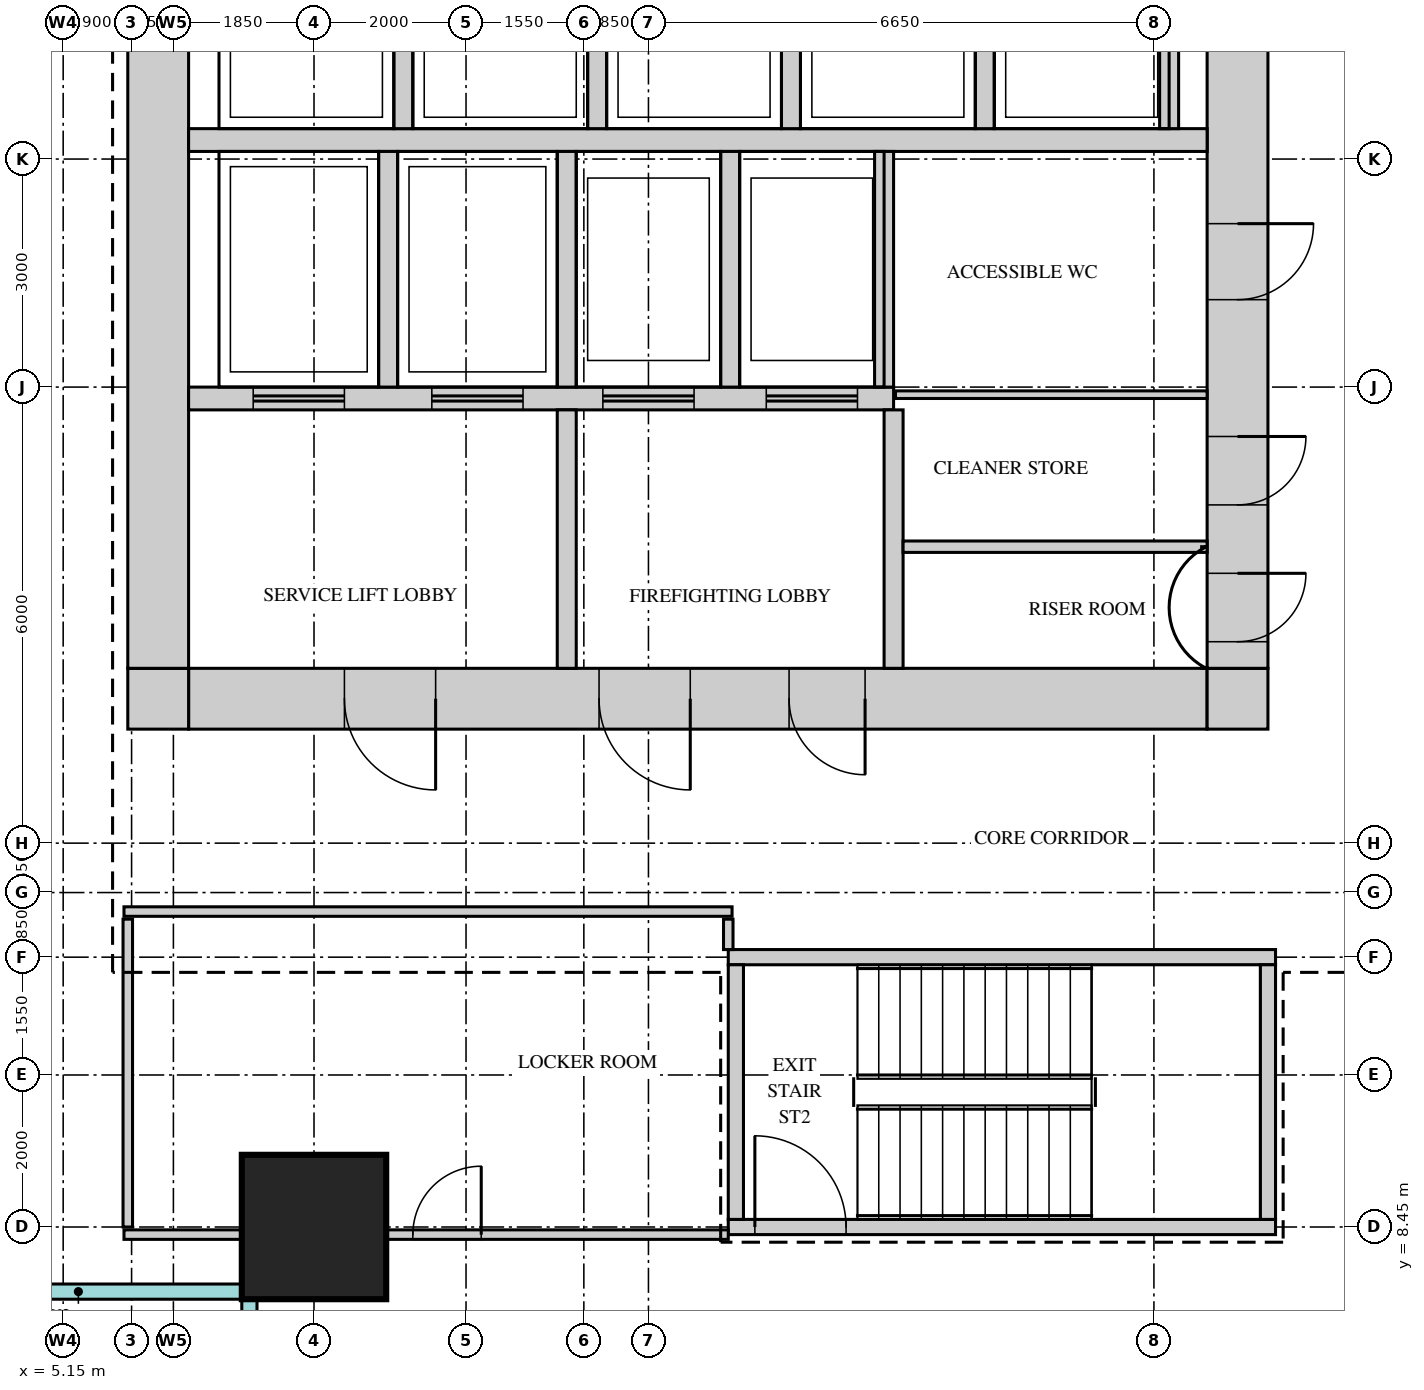
"""IFC4 building model, lengths in metres.
Left out: names, types, materials, properties, quantities, classifications, styles, units other than length and angle.
Written with IfcOpenShell. Run it as: python <this file> out.ifc"""

import sys

from ifc_helpers import new_model, si_unit, direction, frame, frame_2d, origin, origin_2d, place, context, subcontext, project, spatial, rectangle, extrude, source, transform, mapped, element, fill, save


model = new_model("IFC4")
c1 = context("Model", 3, precision=1e-05, world=origin(), true_north=direction((0.0, 1.0)))
c2 = subcontext(c1, "Body", "Model", "MODEL_VIEW")
j1 = project(units=[si_unit("LENGTHUNIT", "METRE"), si_unit("PLANEANGLEUNIT", "RADIAN")], contexts=[c1])
p1 = place(None, origin())
s1 = spatial("IfcSite", under=j1, at=p1, CompositionType="ELEMENT")
p2 = place(p1, origin())
s2 = spatial("IfcBuilding", under=s1, at=p2, CompositionType="ELEMENT")
p3 = place(p2, frame((0.0, 0.0, 192.7)))
s3 = spatial("IfcBuildingStorey", under=s2, at=p3, CompositionType="ELEMENT", Elevation=192.7)
m1 = source(origin(), c2, "Body", "SweptSolid", [
    extrude(rectangle(XDim=13.4, YDim=0.8, at=frame_2d((6.7, 0.0))), origin(), (0.0, 0.0, 1.0), 3.75),
])
p4 = place(p3, frame((6.8, 15.4, 0.0), z_axis=(0.0, 0.0, 1.0), x_axis=(1.0, 0.0, 0.0)))
e1 = element("IfcWall", 1, at=p4, inside=s3, PredefinedType="SHEAR", context=c2, shape_type="MappedRepresentation", body=[
    mapped(m1, transform((0.0, 0.0, 0.0))),
])
m2 = source(origin(), c2, "Body", "SweptSolid", [
    extrude(rectangle(XDim=1.2, YDim=2.1, at=frame_2d((0.6, 1.05))), frame((0.0, 0.41, 0.0), z_axis=(0.0, -1.0, 0.0), x_axis=(1.0, 0.0, 0.0)), (0.0, 0.0, 1.0), 0.82),
])
p5 = place(p4, frame((5.4, 0.0, 0.0)))
e2 = element("IfcOpeningElement", 2, at=p5, cuts=e1, PredefinedType="OPENING", context=c2, shape_type="MappedRepresentation", body=[
    mapped(m2, transform((0.0, 0.0, 0.0))),
])
p6 = place(p4, frame((2.05, 0.0, 0.0)))
e3 = element("IfcOpeningElement", 3, at=p6, cuts=e1, PredefinedType="OPENING", context=c2, shape_type="MappedRepresentation", body=[
    mapped(m2, transform((0.0, 0.0, 0.0))),
])
m3 = source(origin(), c2, "Body", "SweptSolid", [
    extrude(rectangle(XDim=1.0, YDim=2.1, at=frame_2d((0.5, 1.05))), frame((0.0, 0.41, 0.0), z_axis=(0.0, -1.0, 0.0), x_axis=(1.0, 0.0, 0.0)), (0.0, 0.0, 1.0), 0.82),
])
p7 = place(p4, frame((7.9, 0.0, 0.0)))
e4 = element("IfcOpeningElement", 4, at=p7, cuts=e1, PredefinedType="OPENING", context=c2, shape_type="MappedRepresentation", body=[
    mapped(m3, transform((0.0, 0.0, 0.0))),
])
m4 = source(origin(), c2, "Body", "SweptSolid", [
    extrude(rectangle(XDim=0.8, YDim=0.8, at=frame_2d((0.4, 0.0))), origin(), (0.0, 0.0, 1.0), 3.75),
])
for number, where, z_axis, x_axis in (
    (5, (20.2, 15.4, 0.0), (0.0, 0.0, 1.0), (1.0, 0.0, 0.0)),
    (6, (6.0, 15.4, 0.0), (0.0, 0.0, 1.0), (1.0, 0.0, 0.0)),
):
    element("IfcWall", number, at=place(p3, frame(where, z_axis=z_axis, x_axis=x_axis)), inside=s3, PredefinedType="SHEAR", context=c2, shape_type="MappedRepresentation", body=[
        mapped(m4, transform((0.0, 0.0, 0.0))),
    ])
m5 = source(origin(), c2, "Body", "SweptSolid", [
    extrude(rectangle(XDim=22.4, YDim=0.8, at=frame_2d((11.2, 0.0))), origin(), (0.0, 0.0, 1.0), 3.75),
])
p8 = place(p3, frame((20.6, 15.8, 0.0), z_axis=(0.0, 0.0, 1.0), x_axis=(0.0, 1.0, 0.0)))
e7 = element("IfcWall", 7, at=p8, inside=s3, PredefinedType="SHEAR", context=c2, shape_type="MappedRepresentation", body=[
    mapped(m5, transform((0.0, 0.0, 0.0))),
])
m6 = source(origin(), c2, "Body", "SweptSolid", [
    extrude(rectangle(XDim=1.8, YDim=2.1, at=frame_2d((0.9, 1.05))), frame((0.0, 0.41, 0.0), z_axis=(0.0, -1.0, 0.0), x_axis=(1.0, 0.0, 0.0)), (0.0, 0.0, 1.0), 0.82),
])
p9 = place(p8, frame((10.7, 0.0, 0.0)))
e8 = element("IfcOpeningElement", 8, at=p9, cuts=e7, PredefinedType="OPENING", context=c2, shape_type="MappedRepresentation", body=[
    mapped(m6, transform((0.0, 0.0, 0.0))),
])
m7 = source(origin(), c2, "Body", "SweptSolid", [
    extrude(rectangle(XDim=0.9, YDim=2.1, at=frame_2d((0.45, 1.05))), frame((0.0, 0.41, 0.0), z_axis=(0.0, -1.0, 0.0), x_axis=(1.0, 0.0, 0.0)), (0.0, 0.0, 1.0), 0.82),
])
p10 = place(p8, frame((0.35, 0.0, 0.0)))
e9 = element("IfcOpeningElement", 9, at=p10, cuts=e7, PredefinedType="OPENING", context=c2, shape_type="MappedRepresentation", body=[
    mapped(m7, transform((0.0, 0.0, 0.0))),
])
p11 = place(p8, frame((2.15, 0.0, 0.0)))
e10 = element("IfcOpeningElement", 10, at=p11, cuts=e7, PredefinedType="OPENING", context=c2, shape_type="MappedRepresentation", body=[
    mapped(m7, transform((0.0, 0.0, 0.0))),
])
p12 = place(p8, frame((4.85, 0.0, 0.0)))
e11 = element("IfcOpeningElement", 11, at=p12, cuts=e7, PredefinedType="OPENING", context=c2, shape_type="MappedRepresentation", body=[
    mapped(m3, transform((0.0, 0.0, 0.0))),
])
p13 = place(p3, frame((6.4, 15.8, 0.0), z_axis=(0.0, 0.0, 1.0), x_axis=(0.0, 1.0, 0.0)))
e12 = element("IfcWall", 12, at=p13, inside=s3, PredefinedType="SHEAR", context=c2, shape_type="MappedRepresentation", body=[
    mapped(m5, transform((0.0, 0.0, 0.0))),
])
m8 = source(origin(), c2, "Body", "SweptSolid", [
    extrude(rectangle(XDim=7.2, YDim=0.2, at=frame_2d((3.6, 0.0))), origin(), (0.0, 0.0, 1.0), 3.75),
])
p14 = place(p3, frame((13.9, 12.0, 0.0), z_axis=(0.0, 0.0, 1.0), x_axis=(1.0, 0.0, 0.0)))
e13 = element("IfcWall", 13, at=p14, inside=s3, PredefinedType="SHEAR", context=c2, shape_type="MappedRepresentation", body=[
    mapped(m8, transform((0.0, 0.0, 0.0))),
])
p15 = place(p3, frame((13.9, 8.45, 0.0), z_axis=(0.0, 0.0, 1.0), x_axis=(1.0, 0.0, 0.0)))
e14 = element("IfcWall", 14, at=p15, inside=s3, PredefinedType="SHEAR", context=c2, shape_type="MappedRepresentation", body=[
    mapped(m8, transform((0.0, 0.0, 0.0))),
])
m9 = source(origin(), c2, "Body", "SweptSolid", [
    extrude(rectangle(XDim=1.2, YDim=2.1, at=frame_2d((0.6, 1.05))), frame((0.0, 0.11, 0.0), z_axis=(0.0, -1.0, 0.0), x_axis=(1.0, 0.0, 0.0)), (0.0, 0.0, 1.0), 0.22),
])
p16 = place(p15, frame((0.35, 0.0, 0.0)))
e15 = element("IfcOpeningElement", 15, at=p16, cuts=e14, PredefinedType="OPENING", context=c2, shape_type="MappedRepresentation", body=[
    mapped(m9, transform((0.0, 0.0, 0.0))),
])
m10 = source(origin(), c2, "Body", "SweptSolid", [
    extrude(rectangle(XDim=3.35, YDim=0.2, at=frame_2d((1.675, 0.0))), origin(), (0.0, 0.0, 1.0), 3.75),
])
for number, where, z_axis, x_axis in (
    (16, (21.0, 8.55, 0.0), (0.0, 0.0, 1.0), (0.0, 1.0, 0.0)),
    (17, (14.0, 8.55, 0.0), (0.0, 0.0, 1.0), (0.0, 1.0, 0.0)),
):
    element("IfcWall", number, at=place(p3, frame(where, z_axis=z_axis, x_axis=x_axis)), inside=s3, PredefinedType="SHEAR", context=c2, shape_type="MappedRepresentation", body=[
        mapped(m10, transform((0.0, 0.0, 0.0))),
    ])
m11 = source(origin(), c2, "Body", "SweptSolid", [
    extrude(rectangle(XDim=13.4, YDim=0.3, at=frame_2d((6.7, 0.0))), origin(), (0.0, 0.0, 1.0), 3.75),
])
p17 = place(p3, frame((6.8, 22.75, 0.0), z_axis=(0.0, 0.0, 1.0), x_axis=(1.0, 0.0, 0.0)))
e18 = element("IfcWall", 18, at=p17, inside=s3, PredefinedType="STANDARD", context=c2, shape_type="MappedRepresentation", body=[
    mapped(m11, transform((0.0, 0.0, 0.0))),
])
m12 = source(origin(), c2, "Body", "SweptSolid", [
    extrude(rectangle(XDim=9.275, YDim=0.3, at=frame_2d((4.637, 0.0))), origin(), (0.0, 0.0, 1.0), 3.75),
])
p18 = place(p3, frame((6.8, 19.35, 0.0), z_axis=(0.0, 0.0, 1.0), x_axis=(1.0, 0.0, 0.0)))
e19 = element("IfcWall", 19, at=p18, inside=s3, PredefinedType="STANDARD", context=c2, shape_type="MappedRepresentation", body=[
    mapped(m12, transform((0.0, 0.0, 0.0))),
])
m13 = source(origin(), c2, "Body", "SweptSolid", [
    extrude(rectangle(XDim=1.2, YDim=2.1, at=frame_2d((0.6, 1.05))), frame((0.0, 0.16, 0.0), z_axis=(0.0, -1.0, 0.0), x_axis=(1.0, 0.0, 0.0)), (0.0, 0.0, 1.0), 0.32),
])
p19 = place(p18, frame((0.85, 0.0, 0.0)))
e20 = element("IfcOpeningElement", 20, at=p19, cuts=e19, PredefinedType="OPENING", context=c2, shape_type="MappedRepresentation", body=[
    mapped(m13, transform((0.0, 0.0, 0.0))),
])
p20 = place(p18, frame((3.2, 0.0, 0.0)))
e21 = element("IfcOpeningElement", 21, at=p20, cuts=e19, PredefinedType="OPENING", context=c2, shape_type="MappedRepresentation", body=[
    mapped(m13, transform((0.0, 0.0, 0.0))),
])
p21 = place(p18, frame((5.45, 0.0, 0.0)))
e22 = element("IfcOpeningElement", 22, at=p21, cuts=e19, PredefinedType="OPENING", context=c2, shape_type="MappedRepresentation", body=[
    mapped(m13, transform((0.0, 0.0, 0.0))),
])
p22 = place(p18, frame((7.6, 0.0, 0.0)))
e23 = element("IfcOpeningElement", 23, at=p22, cuts=e19, PredefinedType="OPENING", context=c2, shape_type="MappedRepresentation", body=[
    mapped(m13, transform((0.0, 0.0, 0.0))),
])
m14 = source(origin(), c2, "Body", "SweptSolid", [
    extrude(rectangle(XDim=3.1, YDim=0.25, at=frame_2d((1.55, 0.0))), origin(), (0.0, 0.0, 1.0), 3.75),
])
for number, where, z_axis, x_axis in (
    (24, (9.425, 19.5, 0.0), (0.0, 0.0, 1.0), (0.0, 1.0, 0.0)),
    (25, (11.775, 19.5, 0.0), (0.0, 0.0, 1.0), (0.0, 1.0, 0.0)),
    (26, (13.925, 19.5, 0.0), (0.0, 0.0, 1.0), (0.0, 1.0, 0.0)),
    (27, (15.95, 19.5, 0.0), (0.0, 0.0, 1.0), (0.0, 1.0, 0.0)),
):
    element("IfcWall", number, at=place(p3, frame(where, z_axis=z_axis, x_axis=x_axis)), inside=s3, PredefinedType="STANDARD", context=c2, shape_type="MappedRepresentation", body=[
        mapped(m14, transform((0.0, 0.0, 0.0))),
    ])
m15 = source(origin(), c2, "Body", "SweptSolid", [
    extrude(rectangle(XDim=2.4, YDim=0.25, at=frame_2d((1.2, 0.0))), origin(), (0.0, 0.0, 1.0), 3.75),
])
for number, where, z_axis, x_axis in (
    (28, (17.275, 22.9, 0.0), (0.0, 0.0, 1.0), (0.0, 1.0, 0.0)),
    (29, (19.7, 22.9, 0.0), (0.0, 0.0, 1.0), (0.0, 1.0, 0.0)),
    (30, (9.625, 22.9, 0.0), (0.0, 0.0, 1.0), (0.0, 1.0, 0.0)),
    (31, (12.175, 22.9, 0.0), (0.0, 0.0, 1.0), (0.0, 1.0, 0.0)),
    (32, (14.725, 22.9, 0.0), (0.0, 0.0, 1.0), (0.0, 1.0, 0.0)),
):
    element("IfcWall", number, at=place(p3, frame(where, z_axis=z_axis, x_axis=x_axis)), inside=s3, PredefinedType="STANDARD", context=c2, shape_type="MappedRepresentation", body=[
        mapped(m15, transform((0.0, 0.0, 0.0))),
    ])
m16 = source(origin(), c2, "Body", "SweptSolid", [
    extrude(rectangle(XDim=3.4, YDim=0.25, at=frame_2d((1.7, 0.0))), origin(), (0.0, 0.0, 1.0), 3.75),
])
for number, where, z_axis, x_axis in (
    (33, (16.075, 15.8, 0.0), (0.0, 0.0, 1.0), (0.0, 1.0, 0.0)),
    (34, (11.775, 15.8, 0.0), (0.0, 0.0, 1.0), (0.0, 1.0, 0.0)),
):
    element("IfcWall", number, at=place(p3, frame(where, z_axis=z_axis, x_axis=x_axis)), inside=s3, PredefinedType="STANDARD", context=c2, shape_type="MappedRepresentation", body=[
        mapped(m16, transform((0.0, 0.0, 0.0))),
    ])
m17 = source(origin(), c2, "Body", "SweptSolid", [
    extrude(rectangle(XDim=1.9, YDim=1.9, at=origin_2d()), origin(), (0.0, 0.0, 1.0), 4.0),
])
p23 = place(p3, frame((8.45, 8.45, 0.0), z_axis=(0.0, 0.0, 1.0), x_axis=(1.0, 0.0, 0.0)))
e35 = element("IfcColumn", 35, at=p23, inside=s3, PredefinedType="COLUMN", context=c2, shape_type="MappedRepresentation", body=[
    mapped(m17, transform((0.0, 0.0, 0.0))),
])
m18 = source(origin(), c2, "Body", "SweptSolid", [
    extrude(rectangle(XDim=7.95, YDim=0.125, at=frame_2d((3.975, 0.0))), origin(), (0.0, 0.0, 1.0), 3.25),
])
p24 = place(p3, frame((5.95, 8.35, 0.0), z_axis=(0.0, 0.0, 1.0), x_axis=(1.0, 0.0, 0.0)))
e36 = element("IfcWall", 36, at=p24, inside=s3, PredefinedType="PARTITIONING", context=c2, shape_type="MappedRepresentation", body=[
    mapped(m18, transform((0.0, 0.0, 0.0))),
])
m19 = source(origin(), c2, "Body", "SweptSolid", [
    extrude(rectangle(XDim=0.9, YDim=2.1, at=frame_2d((0.45, 1.05))), frame((0.0, 0.073, 0.0), z_axis=(0.0, -1.0, 0.0), x_axis=(1.0, 0.0, 0.0)), (0.0, 0.0, 1.0), 0.145),
])
p25 = place(p24, frame((3.8, 0.0, 0.0)))
e37 = element("IfcOpeningElement", 37, at=p25, cuts=e36, PredefinedType="OPENING", context=c2, shape_type="MappedRepresentation", body=[
    mapped(m19, transform((0.0, 0.0, 0.0))),
])
m20 = source(origin(), c2, "Body", "SweptSolid", [
    extrude(rectangle(XDim=4.05, YDim=0.125, at=frame_2d((2.025, 0.0))), origin(), (0.0, 0.0, 1.0), 3.8),
])
p26 = place(p3, frame((6.0, 8.45, 0.0), z_axis=(0.0, 0.0, 1.0), x_axis=(0.0, 1.0, 0.0)))
e38 = element("IfcWall", 38, at=p26, inside=s3, PredefinedType="PARTITIONING", context=c2, shape_type="MappedRepresentation", body=[
    mapped(m20, transform((0.0, 0.0, 0.0))),
])
m21 = source(origin(), c2, "Body", "SweptSolid", [
    extrude(rectangle(XDim=0.4, YDim=0.125, at=frame_2d((0.2, 0.0))), origin(), (0.0, 0.0, 1.0), 3.8),
])
p27 = place(p3, frame((13.9, 12.1, 0.0), z_axis=(0.0, 0.0, 1.0), x_axis=(0.0, 1.0, 0.0)))
e39 = element("IfcWall", 39, at=p27, inside=s3, PredefinedType="PARTITIONING", context=c2, shape_type="MappedRepresentation", body=[
    mapped(m21, transform((0.0, 0.0, 0.0))),
])
m22 = source(origin(), c2, "Body", "SweptSolid", [
    extrude(rectangle(XDim=8.0, YDim=0.125, at=frame_2d((4.0, 0.0))), origin(), (0.0, 0.0, 1.0), 3.8),
])
p28 = place(p3, frame((5.95, 12.6, 0.0), z_axis=(0.0, 0.0, 1.0), x_axis=(1.0, 0.0, 0.0)))
e40 = element("IfcWall", 40, at=p28, inside=s3, PredefinedType="PARTITIONING", context=c2, shape_type="MappedRepresentation", body=[
    mapped(m22, transform((0.0, 0.0, 0.0))),
])
m23 = source(origin(), c2, "Body", "SweptSolid", [
    extrude(rectangle(XDim=4.0, YDim=0.15, at=frame_2d((2.0, 0.0))), origin(), (0.0, 0.0, 1.0), 3.8),
])
p29 = place(p3, frame((16.2, 17.4, 0.0), z_axis=(0.0, 0.0, 1.0), x_axis=(1.0, 0.0, 0.0)))
e41 = element("IfcWall", 41, at=p29, inside=s3, PredefinedType="PARTITIONING", context=c2, shape_type="MappedRepresentation", body=[
    mapped(m23, transform((0.0, 0.0, 0.0))),
])
m24 = source(origin(), c2, "Body", "SweptSolid", [
    extrude(rectangle(XDim=4.1, YDim=0.1, at=frame_2d((2.05, 0.0))), origin(), (0.0, 0.0, 1.0), 3.8),
])
p30 = place(p3, frame((16.1, 19.4, 0.0), z_axis=(0.0, 0.0, 1.0), x_axis=(1.0, 0.0, 0.0)))
e42 = element("IfcWall", 42, at=p30, inside=s3, PredefinedType="PARTITIONING", context=c2, shape_type="MappedRepresentation", body=[
    mapped(m24, transform((0.0, 0.0, 0.0))),
])
m25 = source(origin(), c2, "Body", "SweptSolid", [
    extrude(rectangle(XDim=0.9, YDim=2.1, at=frame_2d((0.45, 1.05))), frame((0.0, 0.35, 0.0), z_axis=(0.0, -1.0, 0.0), x_axis=(1.0, 0.0, 0.0)), (0.0, 0.0, 1.0), 0.7),
])
p31 = place(p10, origin())
e43 = element("IfcDoor", 43, at=p31, inside=s3, OperationType="SINGLE_SWING_RIGHT", PredefinedType="DOOR", context=c2, shape_type="MappedRepresentation", body=[
    mapped(m25, transform((0.0, 0.0, 0.0))),
])
fill(e9, e43)
p32 = place(p11, origin())
e44 = element("IfcDoor", 44, at=p32, inside=s3, OperationType="SINGLE_SWING_RIGHT", PredefinedType="DOOR", context=c2, shape_type="MappedRepresentation", body=[
    mapped(m25, transform((0.0, 0.0, 0.0))),
])
fill(e10, e44)
m26 = source(origin(), c2, "Body", "SweptSolid", [
    extrude(rectangle(XDim=1.0, YDim=2.1, at=frame_2d((0.5, 1.05))), frame((0.0, 0.35, 0.0), z_axis=(0.0, -1.0, 0.0), x_axis=(1.0, 0.0, 0.0)), (0.0, 0.0, 1.0), 0.7),
])
p33 = place(p12, origin())
e45 = element("IfcDoor", 45, at=p33, inside=s3, OperationType="SINGLE_SWING_RIGHT", PredefinedType="DOOR", context=c2, shape_type="MappedRepresentation", body=[
    mapped(m26, transform((0.0, 0.0, 0.0))),
])
fill(e11, e45)
m27 = source(origin(), c2, "Body", "SweptSolid", [
    extrude(rectangle(XDim=1.2, YDim=2.1, at=frame_2d((0.6, 1.05))), frame((0.0, 0.35, 0.0), z_axis=(0.0, -1.0, 0.0), x_axis=(1.0, 0.0, 0.0)), (0.0, 0.0, 1.0), 0.7),
])
p34 = place(p5, origin())
e46 = element("IfcDoor", 46, at=p34, inside=s3, OperationType="SINGLE_SWING_RIGHT", PredefinedType="DOOR", context=c2, shape_type="MappedRepresentation", body=[
    mapped(m27, transform((0.0, 0.0, 0.0))),
])
fill(e2, e46)
p35 = place(p6, origin())
e47 = element("IfcDoor", 47, at=p35, inside=s3, OperationType="SINGLE_SWING_RIGHT", PredefinedType="DOOR", context=c2, shape_type="MappedRepresentation", body=[
    mapped(m27, transform((0.0, 0.0, 0.0))),
])
fill(e3, e47)
p36 = place(p7, origin())
e48 = element("IfcDoor", 48, at=p36, inside=s3, OperationType="SINGLE_SWING_RIGHT", PredefinedType="DOOR", context=c2, shape_type="MappedRepresentation", body=[
    mapped(m26, transform((0.0, 0.0, 0.0))),
])
fill(e4, e48)
m28 = source(origin(), c2, "Body", "SweptSolid", [
    extrude(rectangle(XDim=0.9, YDim=2.1, at=frame_2d((0.45, 1.05))), frame((0.0, 0.025, 0.0), z_axis=(0.0, -1.0, 0.0), x_axis=(1.0, 0.0, 0.0)), (0.0, 0.0, 1.0), 0.05),
])
p37 = place(p25, origin())
e49 = element("IfcDoor", 49, at=p37, inside=s3, OperationType="SINGLE_SWING_LEFT", PredefinedType="DOOR", context=c2, shape_type="MappedRepresentation", body=[
    mapped(m28, transform((0.0, 0.0, 0.0))),
])
fill(e37, e49)
m29 = source(origin(), c2, "Body", "SweptSolid", [
    extrude(rectangle(XDim=1.2, YDim=2.1, at=frame_2d((0.6, 1.05))), frame((0.0, 0.025, 0.0), z_axis=(0.0, -1.0, 0.0), x_axis=(1.0, 0.0, 0.0)), (0.0, 0.0, 1.0), 0.05),
])
p38 = place(p16, origin())
e50 = element("IfcDoor", 50, at=p38, inside=s3, OperationType="SINGLE_SWING_RIGHT", PredefinedType="DOOR", context=c2, shape_type="MappedRepresentation", body=[
    mapped(m29, transform((0.0, 0.0, 0.0))),
])
fill(e15, e50)
p39 = place(p19, origin())
e51 = element("IfcDoor", 51, at=p39, inside=s3, OperationType="DOUBLE_DOOR_SLIDING", PredefinedType="DOOR", context=c2, shape_type="MappedRepresentation", body=[
    mapped(m29, transform((0.0, 0.0, 0.0))),
])
fill(e20, e51)
p40 = place(p20, origin())
e52 = element("IfcDoor", 52, at=p40, inside=s3, OperationType="DOUBLE_DOOR_SLIDING", PredefinedType="DOOR", context=c2, shape_type="MappedRepresentation", body=[
    mapped(m29, transform((0.0, 0.0, 0.0))),
])
fill(e21, e52)
p41 = place(p21, origin())
e53 = element("IfcDoor", 53, at=p41, inside=s3, OperationType="DOUBLE_DOOR_SLIDING", PredefinedType="DOOR", context=c2, shape_type="MappedRepresentation", body=[
    mapped(m29, transform((0.0, 0.0, 0.0))),
])
fill(e22, e53)
p42 = place(p22, origin())
e54 = element("IfcDoor", 54, at=p42, inside=s3, OperationType="DOUBLE_DOOR_SLIDING", PredefinedType="DOOR", context=c2, shape_type="MappedRepresentation", body=[
    mapped(m29, transform((0.0, 0.0, 0.0))),
])
fill(e23, e54)
save(model, sys.argv[1])
